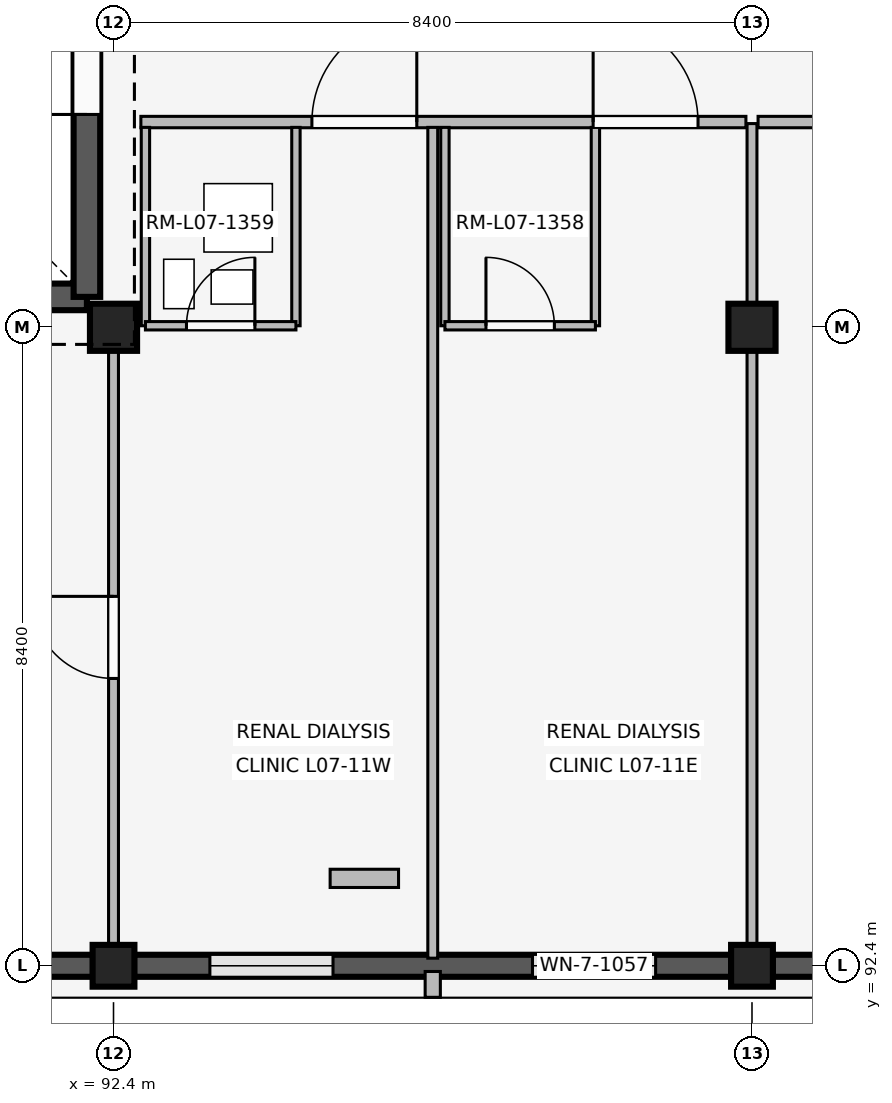
"""IFC4 building model, lengths in metres.
Left out: names, types, materials, properties, quantities, classifications, styles, units other than length and angle.
Written with IfcOpenShell. Run it as: python <this file> out.ifc"""

import sys

from ifc_helpers import new_model, si_unit, direction, frame, frame_2d, origin, origin_2d, place, context, subcontext, project, spatial, rectangle, extrude, element, fill, save


model = new_model("IFC4")
c1 = context("Model", 3, precision=1e-05, world=origin(), true_north=direction((0.0, 1.0)))
c2 = subcontext(c1, "Body", "Model", "MODEL_VIEW")
j1 = project(units=[si_unit("LENGTHUNIT", "METRE"), si_unit("PLANEANGLEUNIT", "RADIAN")], contexts=[c1])
p1 = place(None, origin())
s1 = spatial("IfcSite", under=j1, at=p1, CompositionType="ELEMENT")
p2 = place(p1, origin())
s2 = spatial("IfcBuilding", under=s1, at=p2, CompositionType="ELEMENT")
p3 = place(p2, frame((0.0, 0.0, 28.8)))
s3 = spatial("IfcBuildingStorey", under=s2, at=p3, CompositionType="ELEMENT", Elevation=28.8)
p4 = place(p3, frame((92.4, 92.4, 0.0), z_axis=(0.0, 0.0, 1.0), x_axis=(1.0, 0.0, 0.0)))
e1 = element("IfcColumn", 1, at=p4, inside=s3, PredefinedType="COLUMN", context=c2, shape_type="SweptSolid", body=[
    extrude(rectangle(XDim=0.55, YDim=0.55, at=origin_2d()), origin(), (0.0, 0.0, 1.0), 4.2),
])
p5 = place(p3, frame((92.4, 100.8, 0.0), z_axis=(0.0, 0.0, 1.0), x_axis=(1.0, 0.0, 0.0)))
e2 = element("IfcColumn", 2, at=p5, inside=s3, PredefinedType="COLUMN", context=c2, shape_type="SweptSolid", body=[
    extrude(rectangle(XDim=0.62, YDim=0.62, at=origin_2d()), origin(), (0.0, 0.0, 1.0), 4.2),
])
p6 = place(p3, frame((100.8, 92.4, 0.0), z_axis=(0.0, 0.0, 1.0), x_axis=(1.0, 0.0, 0.0)))
e3 = element("IfcColumn", 3, at=p6, inside=s3, PredefinedType="COLUMN", context=c2, shape_type="SweptSolid", body=[
    extrude(rectangle(XDim=0.55, YDim=0.55, at=origin_2d()), origin(), (0.0, 0.0, 1.0), 4.2),
])
p7 = place(p3, frame((100.8, 100.8, 0.0), z_axis=(0.0, 0.0, 1.0), x_axis=(1.0, 0.0, 0.0)))
e4 = element("IfcColumn", 4, at=p7, inside=s3, PredefinedType="COLUMN", context=c2, shape_type="SweptSolid", body=[
    extrude(rectangle(XDim=0.62, YDim=0.62, at=origin_2d()), origin(), (0.0, 0.0, 1.0), 4.2),
])
p8 = place(p3, frame((92.13, 92.4, 0.0), z_axis=(0.0, 0.0, 1.0), x_axis=(-1.0, 0.0, 0.0)))
e5 = element("IfcWall", 5, at=p8, inside=s3, PredefinedType="SOLIDWALL", context=c2, shape_type="SweptSolid", body=[
    extrude(rectangle(XDim=7.86, YDim=0.29, at=frame_2d((3.93, 0.0))), origin(), (0.0, 0.0, 1.0), 3.34),
])
p9 = place(p8, frame((1.028, 0.0, 0.85)))
e6 = element("IfcOpeningElement", 6, at=p9, cuts=e5, PredefinedType="OPENING", context=c2, shape_type="SweptSolid", body=[
    extrude(rectangle(XDim=1.56, YDim=1.7, at=frame_2d((0.78, 0.85))), frame((0.0, 0.155, 0.0), z_axis=(0.0, -1.0, 0.0), x_axis=(1.0, 0.0, 0.0)), (0.0, 0.0, 1.0), 0.31),
])
p10 = place(p8, frame((5.272, 0.0, 0.85)))
e7 = element("IfcOpeningElement", 7, at=p10, cuts=e5, PredefinedType="OPENING", context=c2, shape_type="SweptSolid", body=[
    extrude(rectangle(XDim=1.56, YDim=1.7, at=frame_2d((0.78, 0.85))), frame((0.0, 0.155, 0.0), z_axis=(0.0, -1.0, 0.0), x_axis=(1.0, 0.0, 0.0)), (0.0, 0.0, 1.0), 0.31),
])
p11 = place(p3, frame((100.53, 92.4, 0.0), z_axis=(0.0, 0.0, 1.0), x_axis=(-1.0, 0.0, 0.0)))
e8 = element("IfcWall", 8, at=p11, inside=s3, PredefinedType="SOLIDWALL", context=c2, shape_type="SweptSolid", body=[
    extrude(rectangle(XDim=7.86, YDim=0.29, at=frame_2d((3.93, 0.0))), origin(), (0.0, 0.0, 1.0), 3.34),
])
p12 = place(p11, frame((0.998, 0.0, 0.85)))
e9 = element("IfcOpeningElement", 9, at=p12, cuts=e8, PredefinedType="OPENING", context=c2, shape_type="SweptSolid", body=[
    extrude(rectangle(XDim=1.62, YDim=1.8, at=frame_2d((0.81, 0.9))), frame((0.0, 0.155, 0.0), z_axis=(0.0, -1.0, 0.0), x_axis=(1.0, 0.0, 0.0)), (0.0, 0.0, 1.0), 0.31),
])
p13 = place(p11, frame((5.242, 0.0, 0.85)))
e10 = element("IfcOpeningElement", 10, at=p13, cuts=e8, PredefinedType="OPENING", context=c2, shape_type="SweptSolid", body=[
    extrude(rectangle(XDim=1.62, YDim=1.8, at=frame_2d((0.81, 0.9))), frame((0.0, 0.155, 0.0), z_axis=(0.0, -1.0, 0.0), x_axis=(1.0, 0.0, 0.0)), (0.0, 0.0, 1.0), 0.31),
])
p14 = place(p3, frame((96.6, 92.325, 0.0), z_axis=(0.0, 0.0, 1.0), x_axis=(0.0, -1.0, 0.0)))
e11 = element("IfcWall", 11, at=p14, inside=s3, PredefinedType="ELEMENTEDWALL", context=c2, shape_type="SweptSolid", body=[
    extrude(rectangle(XDim=0.34, YDim=0.2, at=frame_2d((0.17, 0.0))), origin(), (0.0, 0.0, 1.0), 3.32),
])
p15 = place(p3, frame((108.93, 92.4, 0.0), z_axis=(0.0, 0.0, 1.0), x_axis=(-1.0, 0.0, 0.0)))
e12 = element("IfcWall", 12, at=p15, inside=s3, PredefinedType="SOLIDWALL", context=c2, shape_type="SweptSolid", body=[
    extrude(rectangle(XDim=7.86, YDim=0.29, at=frame_2d((3.93, 0.0))), origin(), (0.0, 0.0, 1.0), 3.34),
])
p16 = place(p15, frame((1.088, 0.0, 0.85)))
e13 = element("IfcOpeningElement", 13, at=p16, cuts=e12, PredefinedType="OPENING", context=c2, shape_type="SweptSolid", body=[
    extrude(rectangle(XDim=1.44, YDim=1.62, at=frame_2d((0.72, 0.81))), frame((0.0, 0.155, 0.0), z_axis=(0.0, -1.0, 0.0), x_axis=(1.0, 0.0, 0.0)), (0.0, 0.0, 1.0), 0.31),
])
p17 = place(p15, frame((5.332, 0.0, 0.85)))
e14 = element("IfcOpeningElement", 14, at=p17, cuts=e12, PredefinedType="OPENING", context=c2, shape_type="SweptSolid", body=[
    extrude(rectangle(XDim=1.44, YDim=1.62, at=frame_2d((0.72, 0.81))), frame((0.0, 0.155, 0.0), z_axis=(0.0, -1.0, 0.0), x_axis=(1.0, 0.0, 0.0)), (0.0, 0.0, 1.0), 0.31),
])
p18 = place(p3, frame((84.55, 101.2, 0.0), z_axis=(0.0, 0.0, 1.0), x_axis=(1.0, 0.0, 0.0)))
e15 = element("IfcWall", 15, at=p18, inside=s3, PredefinedType="SHEAR", context=c2, shape_type="SweptSolid", body=[
    extrude(rectangle(XDim=7.5, YDim=0.35, at=frame_2d((3.75, 0.0))), origin(), (0.0, 0.0, 1.0), 3.94),
])
p19 = place(p18, frame((4.85, 0.0, 0.0)))
e16 = element("IfcOpeningElement", 16, at=p19, cuts=e15, PredefinedType="OPENING", context=c2, shape_type="SweptSolid", body=[
    extrude(rectangle(XDim=1.2, YDim=2.2, at=frame_2d((0.6, 1.1))), frame((0.0, 0.185, 0.0), z_axis=(0.0, -1.0, 0.0), x_axis=(1.0, 0.0, 0.0)), (0.0, 0.0, 1.0), 0.37),
])
p20 = place(p3, frame((92.05, 101.2, 0.0), z_axis=(0.0, 0.0, 1.0), x_axis=(0.0, 1.0, 0.0)))
e17 = element("IfcWall", 17, at=p20, inside=s3, PredefinedType="SHEAR", context=c2, shape_type="SweptSolid", body=[
    extrude(rectangle(XDim=7.55, YDim=0.35, at=frame_2d((3.775, 0.0))), origin(), (0.0, 0.0, 1.0), 3.94),
])
p21 = place(p20, frame((2.4, 0.0, 0.0)))
e18 = element("IfcOpeningElement", 18, at=p21, cuts=e17, PredefinedType="OPENING", context=c2, shape_type="SweptSolid", body=[
    extrude(rectangle(XDim=1.2, YDim=2.2, at=frame_2d((0.6, 1.1))), frame((0.0, 0.185, 0.0), z_axis=(0.0, -1.0, 0.0), x_axis=(1.0, 0.0, 0.0)), (0.0, 0.0, 1.0), 0.37),
])
p22 = place(p3, frame((92.4, 92.54, 0.0), z_axis=(0.0, 0.0, 1.0), x_axis=(0.0, 1.0, 0.0)))
e19 = element("IfcWall", 19, at=p22, inside=s3, PredefinedType="PARTITIONING", context=c2, shape_type="SweptSolid", body=[
    extrude(rectangle(XDim=8.21, YDim=0.13, at=frame_2d((4.105, 0.0))), origin(), (0.0, 0.0, 1.0), 3.32),
])
p23 = place(p22, frame((3.64, 0.0, 0.0)))
e20 = element("IfcOpeningElement", 20, at=p23, cuts=e19, PredefinedType="OPENING", context=c2, shape_type="SweptSolid", body=[
    extrude(rectangle(XDim=1.08, YDim=2.15, at=frame_2d((0.54, 1.075))), frame((0.0, 0.075, 0.0), z_axis=(0.0, -1.0, 0.0), x_axis=(1.0, 0.0, 0.0)), (0.0, 0.0, 1.0), 0.15),
])
p24 = place(p3, frame((92.76, 103.5, 0.0), z_axis=(0.0, 0.0, 1.0), x_axis=(1.0, 0.0, 0.0)))
e21 = element("IfcWall", 21, at=p24, inside=s3, PredefinedType="PARTITIONING", context=c2, shape_type="SweptSolid", body=[
    extrude(rectangle(XDim=7.96, YDim=0.15, at=frame_2d((3.98, 0.0))), origin(), (0.0, 0.0, 1.0), 3.32),
])
p25 = place(p24, frame((2.25, 0.0, 0.0)))
e22 = element("IfcOpeningElement", 22, at=p25, cuts=e21, PredefinedType="OPENING", context=c2, shape_type="SweptSolid", body=[
    extrude(rectangle(XDim=1.38, YDim=2.25, at=frame_2d((0.69, 1.125))), frame((0.0, 0.085, 0.0), z_axis=(0.0, -1.0, 0.0), x_axis=(1.0, 0.0, 0.0)), (0.0, 0.0, 1.0), 0.17),
])
p26 = place(p24, frame((5.95, 0.0, 0.0)))
e23 = element("IfcOpeningElement", 23, at=p26, cuts=e21, PredefinedType="OPENING", context=c2, shape_type="SweptSolid", body=[
    extrude(rectangle(XDim=1.38, YDim=2.25, at=frame_2d((0.69, 1.125))), frame((0.0, 0.085, 0.0), z_axis=(0.0, -1.0, 0.0), x_axis=(1.0, 0.0, 0.0)), (0.0, 0.0, 1.0), 0.17),
])
p27 = place(p3, frame((96.6, 92.5, 0.0), z_axis=(0.0, 0.0, 1.0), x_axis=(0.0, 1.0, 0.0)))
e24 = element("IfcWall", 24, at=p27, inside=s3, PredefinedType="PARTITIONING", context=c2, shape_type="SweptSolid", body=[
    extrude(rectangle(XDim=10.93, YDim=0.13, at=frame_2d((5.465, 0.0))), origin(), (0.0, 0.0, 1.0), 3.32),
])
for number, where, z_axis, x_axis in (
    (25, (92.82, 100.82, 0.0), (0.0, 0.0, 1.0), (0.0, 1.0, 0.0)),
    (26, (94.8, 100.82, 0.0), (0.0, 0.0, 1.0), (0.0, 1.0, 0.0)),
):
    element("IfcWall", number, at=place(p3, frame(where, z_axis=z_axis, x_axis=x_axis)), inside=s3, PredefinedType="PARTITIONING", context=c2, shape_type="SweptSolid", body=[
        extrude(rectangle(XDim=2.61, YDim=0.11, at=frame_2d((1.305, 0.0))), origin(), (0.0, 0.0, 1.0), 3.32),
    ])
p28 = place(p3, frame((92.82, 100.82, 0.0), z_axis=(0.0, 0.0, 1.0), x_axis=(1.0, 0.0, 0.0)))
e27 = element("IfcWall", 27, at=p28, inside=s3, PredefinedType="PARTITIONING", context=c2, shape_type="SweptSolid", body=[
    extrude(rectangle(XDim=1.98, YDim=0.11, at=frame_2d((0.99, 0.0))), origin(), (0.0, 0.0, 1.0), 3.32),
])
p29 = place(p28, frame((0.54, 0.0, 0.0)))
e28 = element("IfcOpeningElement", 28, at=p29, cuts=e27, PredefinedType="OPENING", context=c2, shape_type="SweptSolid", body=[
    extrude(rectangle(XDim=0.9, YDim=2.1, at=frame_2d((0.45, 1.05))), frame((0.0, 0.065, 0.0), z_axis=(0.0, -1.0, 0.0), x_axis=(1.0, 0.0, 0.0)), (0.0, 0.0, 1.0), 0.13),
])
for number, where, z_axis, x_axis in (
    (29, (96.76, 100.82, 0.0), (0.0, 0.0, 1.0), (0.0, 1.0, 0.0)),
    (30, (98.74, 100.82, 0.0), (0.0, 0.0, 1.0), (0.0, 1.0, 0.0)),
):
    element("IfcWall", number, at=place(p3, frame(where, z_axis=z_axis, x_axis=x_axis)), inside=s3, PredefinedType="PARTITIONING", context=c2, shape_type="SweptSolid", body=[
        extrude(rectangle(XDim=2.61, YDim=0.11, at=frame_2d((1.305, 0.0))), origin(), (0.0, 0.0, 1.0), 3.32),
    ])
p30 = place(p3, frame((96.76, 100.82, 0.0), z_axis=(0.0, 0.0, 1.0), x_axis=(1.0, 0.0, 0.0)))
e31 = element("IfcWall", 31, at=p30, inside=s3, PredefinedType="PARTITIONING", context=c2, shape_type="SweptSolid", body=[
    extrude(rectangle(XDim=1.98, YDim=0.11, at=frame_2d((0.99, 0.0))), origin(), (0.0, 0.0, 1.0), 3.32),
])
p31 = place(p30, frame((0.54, 0.0, 0.0)))
e32 = element("IfcOpeningElement", 32, at=p31, cuts=e31, PredefinedType="OPENING", context=c2, shape_type="SweptSolid", body=[
    extrude(rectangle(XDim=0.9, YDim=2.1, at=frame_2d((0.45, 1.05))), frame((0.0, 0.065, 0.0), z_axis=(0.0, -1.0, 0.0), x_axis=(1.0, 0.0, 0.0)), (0.0, 0.0, 1.0), 0.13),
])
p32 = place(p3, frame((95.25, 93.55, 0.0), z_axis=(0.0, 0.0, 1.0), x_axis=(1.0, 0.0, 0.0)))
e33 = element("IfcWall", 33, at=p32, inside=s3, PredefinedType="PLUMBINGWALL", context=c2, shape_type="SweptSolid", body=[
    extrude(rectangle(XDim=0.9, YDim=0.24, at=frame_2d((0.45, 0.0))), origin(), (0.0, 0.0, 1.0), 3.32),
])
p33 = place(p3, frame((100.8, 92.54, 0.0), z_axis=(0.0, 0.0, 1.0), x_axis=(0.0, 1.0, 0.0)))
e34 = element("IfcWall", 34, at=p33, inside=s3, PredefinedType="PARTITIONING", context=c2, shape_type="SweptSolid", body=[
    extrude(rectangle(XDim=10.94, YDim=0.13, at=frame_2d((5.47, 0.0))), origin(), (0.0, 0.0, 1.0), 3.32),
])
p34 = place(p3, frame((100.88, 103.5, 0.0), z_axis=(0.0, 0.0, 1.0), x_axis=(1.0, 0.0, 0.0)))
e35 = element("IfcWall", 35, at=p34, inside=s3, PredefinedType="PARTITIONING", context=c2, shape_type="SweptSolid", body=[
    extrude(rectangle(XDim=8.18, YDim=0.15, at=frame_2d((4.09, 0.0))), origin(), (0.0, 0.0, 1.0), 3.32),
])
p35 = place(p34, frame((1.53, 0.0, 0.0)))
e36 = element("IfcOpeningElement", 36, at=p35, cuts=e35, PredefinedType="OPENING", context=c2, shape_type="SweptSolid", body=[
    extrude(rectangle(XDim=1.85, YDim=2.3, at=frame_2d((0.925, 1.15))), frame((0.0, 0.085, 0.0), z_axis=(0.0, -1.0, 0.0), x_axis=(1.0, 0.0, 0.0)), (0.0, 0.0, 1.0), 0.17),
])
p36 = place(p12, origin())
e37 = element("IfcWindow", 37, at=p36, inside=s3, PartitioningType="SINGLE_PANEL", PredefinedType="WINDOW", context=c2, shape_type="SweptSolid", body=[
    extrude(rectangle(XDim=1.62, YDim=1.8, at=frame_2d((0.81, 0.9))), frame((0.0, 0.03, 0.0), z_axis=(0.0, -1.0, 0.0), x_axis=(1.0, 0.0, 0.0)), (0.0, 0.0, 1.0), 0.06),
])
fill(e9, e37)
p37 = place(p13, origin())
e38 = element("IfcWindow", 38, at=p37, inside=s3, PartitioningType="SINGLE_PANEL", PredefinedType="WINDOW", context=c2, shape_type="SweptSolid", body=[
    extrude(rectangle(XDim=1.62, YDim=1.8, at=frame_2d((0.81, 0.9))), frame((0.0, 0.03, 0.0), z_axis=(0.0, -1.0, 0.0), x_axis=(1.0, 0.0, 0.0)), (0.0, 0.0, 1.0), 0.06),
])
fill(e10, e38)
p38 = place(p21, origin())
e39 = element("IfcDoor", 39, at=p38, inside=s3, OperationType="SINGLE_SWING_LEFT", PredefinedType="DOOR", context=c2, shape_type="SweptSolid", body=[
    extrude(rectangle(XDim=1.2, YDim=2.2, at=frame_2d((0.6, 1.1))), frame((0.0, 0.025, 0.0), z_axis=(0.0, -1.0, 0.0), x_axis=(1.0, 0.0, 0.0)), (0.0, 0.0, 1.0), 0.05),
])
fill(e18, e39)
p39 = place(p23, origin())
e40 = element("IfcDoor", 40, at=p39, inside=s3, OperationType="SINGLE_SWING_RIGHT", PredefinedType="DOOR", context=c2, shape_type="SweptSolid", body=[
    extrude(rectangle(XDim=1.08, YDim=2.15, at=frame_2d((0.54, 1.075))), frame((0.0, 0.025, 0.0), z_axis=(0.0, -1.0, 0.0), x_axis=(1.0, 0.0, 0.0)), (0.0, 0.0, 1.0), 0.05),
])
fill(e20, e40)
p40 = place(p25, origin())
e41 = element("IfcDoor", 41, at=p40, inside=s3, OperationType="SINGLE_SWING_RIGHT", PredefinedType="DOOR", context=c2, shape_type="SweptSolid", body=[
    extrude(rectangle(XDim=1.38, YDim=2.25, at=frame_2d((0.69, 1.125))), frame((0.0, 0.025, 0.0), z_axis=(0.0, -1.0, 0.0), x_axis=(1.0, 0.0, 0.0)), (0.0, 0.0, 1.0), 0.05),
])
fill(e22, e41)
p41 = place(p26, origin())
e42 = element("IfcDoor", 42, at=p41, inside=s3, OperationType="SINGLE_SWING_LEFT", PredefinedType="DOOR", context=c2, shape_type="SweptSolid", body=[
    extrude(rectangle(XDim=1.38, YDim=2.25, at=frame_2d((0.69, 1.125))), frame((0.0, 0.025, 0.0), z_axis=(0.0, -1.0, 0.0), x_axis=(1.0, 0.0, 0.0)), (0.0, 0.0, 1.0), 0.05),
])
fill(e23, e42)
p42 = place(p29, origin())
e43 = element("IfcDoor", 43, at=p42, inside=s3, OperationType="SINGLE_SWING_RIGHT", PredefinedType="DOOR", context=c2, shape_type="SweptSolid", body=[
    extrude(rectangle(XDim=0.9, YDim=2.1, at=frame_2d((0.45, 1.05))), frame((0.0, 0.025, 0.0), z_axis=(0.0, -1.0, 0.0), x_axis=(1.0, 0.0, 0.0)), (0.0, 0.0, 1.0), 0.05),
])
fill(e28, e43)
p43 = place(p31, origin())
e44 = element("IfcDoor", 44, at=p43, inside=s3, OperationType="SINGLE_SWING_LEFT", PredefinedType="DOOR", context=c2, shape_type="SweptSolid", body=[
    extrude(rectangle(XDim=0.9, YDim=2.1, at=frame_2d((0.45, 1.05))), frame((0.0, 0.025, 0.0), z_axis=(0.0, -1.0, 0.0), x_axis=(1.0, 0.0, 0.0)), (0.0, 0.0, 1.0), 0.05),
])
fill(e32, e44)
save(model, sys.argv[1])
